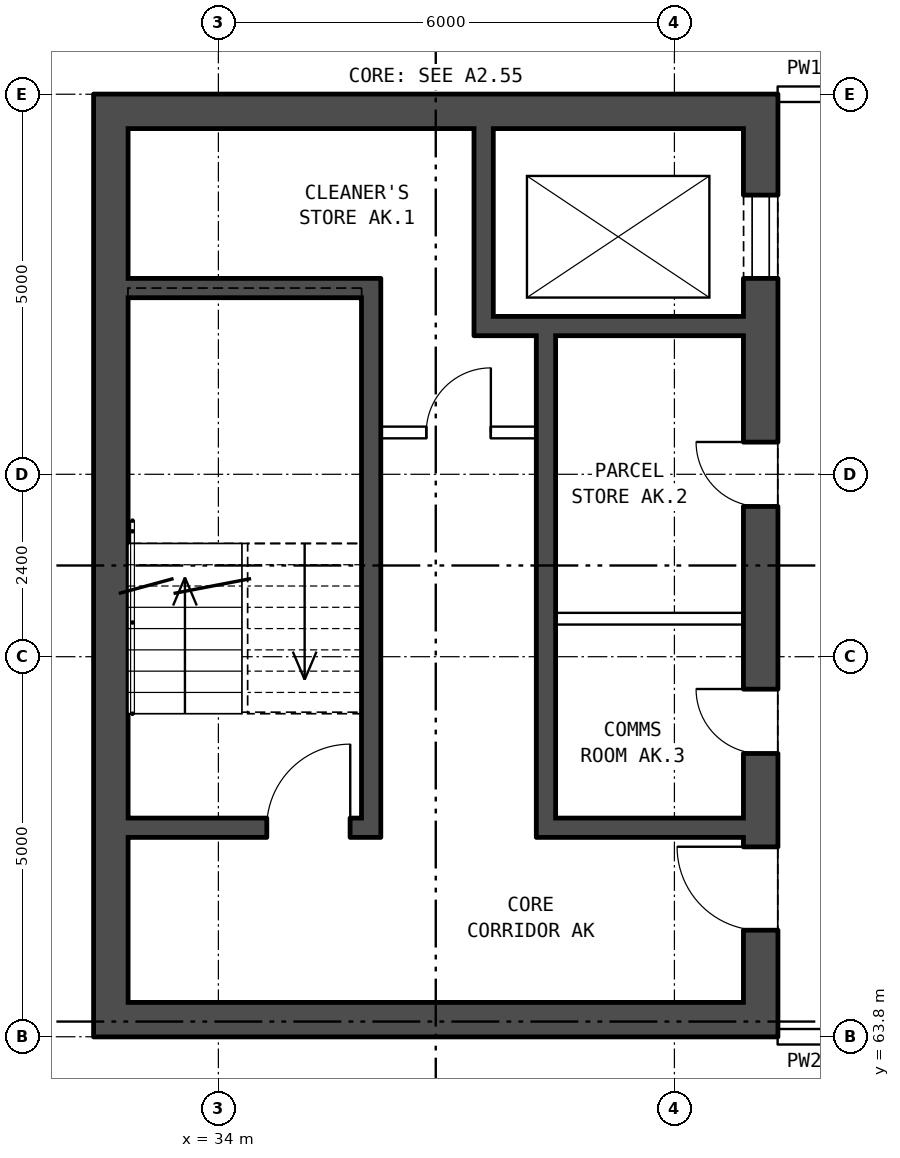
"""IFC4 building model, lengths in metres.
Left out: names, types, materials, properties, quantities, classifications, styles, units other than length and angle.
Written with IfcOpenShell. Run it as: python <this file> out.ifc"""

import sys

from ifc_helpers import new_model, si_unit, direction, frame, frame_2d, origin, place, context, subcontext, project, spatial, rectangle, extrude, element, fill, save


model = new_model("IFC4")
c1 = context("Model", 3, precision=1e-05, world=origin(), true_north=direction((0.0, 1.0)))
c2 = subcontext(c1, "Body", "Model", "MODEL_VIEW")
j1 = project(units=[si_unit("LENGTHUNIT", "METRE"), si_unit("PLANEANGLEUNIT", "RADIAN")], contexts=[c1])
p1 = place(None, origin())
s1 = spatial("IfcSite", under=j1, at=p1, CompositionType="ELEMENT")
p2 = place(p1, origin())
s2 = spatial("IfcBuilding", under=s1, at=p2, CompositionType="ELEMENT")
p3 = place(p2, frame((0.0, 0.0, 191.3)))
s3 = spatial("IfcBuildingStorey", under=s2, at=p3, CompositionType="ELEMENT", Elevation=191.3)
p4 = place(p3, frame((41.135, 76.2, 0.0), z_axis=(0.0, 0.0, 1.0), x_axis=(0.0, -1.0, 0.0)))
e1 = element("IfcWall", 1, at=p4, inside=s3, PredefinedType="SHEAR", context=c2, shape_type="SweptSolid", body=[
    extrude(rectangle(XDim=12.4, YDim=0.45, at=frame_2d((6.2, 0.0))), origin(), (0.0, 0.0, 1.0), 2.85),
])
p5 = place(p4, frame((1.325, 0.0, 0.0)))
e2 = element("IfcOpeningElement", 2, at=p5, cuts=e1, PredefinedType="OPENING", context=c2, shape_type="SweptSolid", body=[
    extrude(rectangle(XDim=1.1, YDim=2.1, at=frame_2d((0.55, 1.05))), frame((0.0, 0.235, 0.0), z_axis=(0.0, -1.0, 0.0), x_axis=(1.0, 0.0, 0.0)), (0.0, 0.0, 1.0), 0.47),
])
p6 = place(p4, frame((4.575, 0.0, 0.0)))
e3 = element("IfcOpeningElement", 3, at=p6, cuts=e1, PredefinedType="OPENING", context=c2, shape_type="SweptSolid", body=[
    extrude(rectangle(XDim=0.85, YDim=2.1, at=frame_2d((0.425, 1.05))), frame((0.0, 0.235, 0.0), z_axis=(0.0, -1.0, 0.0), x_axis=(1.0, 0.0, 0.0)), (0.0, 0.0, 1.0), 0.47),
])
p7 = place(p4, frame((7.825, 0.0, 0.0)))
e4 = element("IfcOpeningElement", 4, at=p7, cuts=e1, PredefinedType="OPENING", context=c2, shape_type="SweptSolid", body=[
    extrude(rectangle(XDim=0.85, YDim=2.1, at=frame_2d((0.425, 1.05))), frame((0.0, 0.235, 0.0), z_axis=(0.0, -1.0, 0.0), x_axis=(1.0, 0.0, 0.0)), (0.0, 0.0, 1.0), 0.47),
])
p8 = place(p4, frame((9.9, 0.0, 0.0)))
e5 = element("IfcOpeningElement", 5, at=p8, cuts=e1, PredefinedType="OPENING", context=c2, shape_type="SweptSolid", body=[
    extrude(rectangle(XDim=1.1, YDim=2.1, at=frame_2d((0.55, 1.05))), frame((0.0, 0.235, 0.0), z_axis=(0.0, -1.0, 0.0), x_axis=(1.0, 0.0, 0.0)), (0.0, 0.0, 1.0), 0.47),
])
p9 = place(p3, frame((32.585, 76.2, 0.0), z_axis=(0.0, 0.0, 1.0), x_axis=(0.0, -1.0, 0.0)))
e6 = element("IfcWall", 6, at=p9, inside=s3, PredefinedType="SHEAR", context=c2, shape_type="SweptSolid", body=[
    extrude(rectangle(XDim=12.4, YDim=0.45, at=frame_2d((6.2, 0.0))), origin(), (0.0, 0.0, 1.0), 2.85),
])
for number, where, z_axis, x_axis in (
    (7, (40.91, 75.975, 0.0), (0.0, 0.0, 1.0), (-1.0, 0.0, 0.0)),
    (8, (40.91, 64.025, 0.0), (0.0, 0.0, 1.0), (-1.0, 0.0, 0.0)),
):
    element("IfcWall", number, at=place(p3, frame(where, z_axis=z_axis, x_axis=x_axis)), inside=s3, PredefinedType="SHEAR", context=c2, shape_type="SweptSolid", body=[
        extrude(rectangle(XDim=8.1, YDim=0.45, at=frame_2d((4.05, 0.0))), origin(), (0.0, 0.0, 1.0), 2.85),
    ])
p10 = place(p3, frame((35.885, 73.65, 0.0), z_axis=(0.0, 0.0, 1.0), x_axis=(-1.0, 0.0, 0.0)))
e9 = element("IfcWall", 9, at=p10, inside=s3, PredefinedType="SHEAR", context=c2, shape_type="SweptSolid", body=[
    extrude(rectangle(XDim=3.075, YDim=0.25, at=frame_2d((1.538, 0.0))), origin(), (0.0, 0.0, 1.0), 2.85),
])
p11 = place(p3, frame((40.91, 73.15, 0.0), z_axis=(0.0, 0.0, 1.0), x_axis=(-1.0, 0.0, 0.0)))
e10 = element("IfcWall", 10, at=p11, inside=s3, PredefinedType="SHEAR", context=c2, shape_type="SweptSolid", body=[
    extrude(rectangle(XDim=3.545, YDim=0.25, at=frame_2d((1.772, 0.0))), origin(), (0.0, 0.0, 1.0), 2.85),
])
p12 = place(p3, frame((38.185, 71.75, 0.0), z_axis=(0.0, 0.0, 1.0), x_axis=(-1.0, 0.0, 0.0)))
e11 = element("IfcWall", 11, at=p12, inside=s3, PredefinedType="PARTITIONING", context=c2, shape_type="SweptSolid", body=[
    extrude(rectangle(XDim=2.05, YDim=0.15, at=frame_2d((1.025, 0.0))), origin(), (0.0, 0.0, 1.0), 2.85),
])
p13 = place(p12, frame((0.6, 0.0, 0.0)))
e12 = element("IfcOpeningElement", 12, at=p13, cuts=e11, PredefinedType="OPENING", context=c2, shape_type="SweptSolid", body=[
    extrude(rectangle(XDim=0.85, YDim=2.1, at=frame_2d((0.425, 1.05))), frame((0.0, 0.085, 0.0), z_axis=(0.0, -1.0, 0.0), x_axis=(1.0, 0.0, 0.0)), (0.0, 0.0, 1.0), 0.17),
])
p14 = place(p3, frame((40.91, 69.3, 0.0), z_axis=(0.0, 0.0, 1.0), x_axis=(-1.0, 0.0, 0.0)))
e13 = element("IfcWall", 13, at=p14, inside=s3, PredefinedType="PARTITIONING", context=c2, shape_type="SweptSolid", body=[
    extrude(rectangle(XDim=2.475, YDim=0.15, at=frame_2d((1.237, 0.0))), origin(), (0.0, 0.0, 1.0), 2.85),
])
p15 = place(p3, frame((40.91, 66.55, 0.0), z_axis=(0.0, 0.0, 1.0), x_axis=(-1.0, 0.0, 0.0)))
e14 = element("IfcWall", 14, at=p15, inside=s3, PredefinedType="SHEAR", context=c2, shape_type="SweptSolid", body=[
    extrude(rectangle(XDim=2.475, YDim=0.25, at=frame_2d((1.237, 0.0))), origin(), (0.0, 0.0, 1.0), 2.85),
])
p16 = place(p3, frame((35.885, 66.55, 0.0), z_axis=(0.0, 0.0, 1.0), x_axis=(-1.0, 0.0, 0.0)))
e15 = element("IfcWall", 15, at=p16, inside=s3, PredefinedType="SHEAR", context=c2, shape_type="SweptSolid", body=[
    extrude(rectangle(XDim=3.075, YDim=0.25, at=frame_2d((1.538, 0.0))), origin(), (0.0, 0.0, 1.0), 2.85),
])
p17 = place(p16, frame((0.15, 0.0, 0.0)))
e16 = element("IfcOpeningElement", 16, at=p17, cuts=e15, PredefinedType="OPENING", context=c2, shape_type="SweptSolid", body=[
    extrude(rectangle(XDim=1.1, YDim=2.1, at=frame_2d((0.55, 1.05))), frame((0.0, 0.135, 0.0), z_axis=(0.0, -1.0, 0.0), x_axis=(1.0, 0.0, 0.0)), (0.0, 0.0, 1.0), 0.27),
])
p18 = place(p3, frame((38.31, 73.025, 0.0), z_axis=(0.0, 0.0, 1.0), x_axis=(0.0, -1.0, 0.0)))
e17 = element("IfcWall", 17, at=p18, inside=s3, PredefinedType="SHEAR", context=c2, shape_type="SweptSolid", body=[
    extrude(rectangle(XDim=6.6, YDim=0.25, at=frame_2d((3.3, 0.0))), origin(), (0.0, 0.0, 1.0), 2.85),
])
p19 = place(p3, frame((37.49, 75.75, 0.0), z_axis=(0.0, 0.0, 1.0), x_axis=(0.0, -1.0, 0.0)))
e18 = element("IfcWall", 18, at=p19, inside=s3, PredefinedType="SHEAR", context=c2, shape_type="SweptSolid", body=[
    extrude(rectangle(XDim=2.475, YDim=0.25, at=frame_2d((1.238, 0.0))), origin(), (0.0, 0.0, 1.0), 2.85),
])
p20 = place(p3, frame((36.01, 73.775, 0.0), z_axis=(0.0, 0.0, 1.0), x_axis=(0.0, -1.0, 0.0)))
e19 = element("IfcWall", 19, at=p20, inside=s3, PredefinedType="SHEAR", context=c2, shape_type="SweptSolid", body=[
    extrude(rectangle(XDim=7.35, YDim=0.25, at=frame_2d((3.675, 0.0))), origin(), (0.0, 0.0, 1.0), 2.85),
])
p21 = place(p3, frame((41.36, 63.8, 0.0), z_axis=(0.0, 0.0, 1.0), x_axis=(1.0, 0.0, 0.0)))
e20 = element("IfcWall", 20, at=p21, inside=s3, PredefinedType="PARTITIONING", context=c2, shape_type="SweptSolid", body=[
    extrude(rectangle(XDim=3.0, YDim=0.2, at=frame_2d((1.5, 0.0))), origin(), (0.0, 0.0, 1.0), 2.85),
])
p22 = place(p21, frame((1.0, 0.0, 0.0)))
e21 = element("IfcOpeningElement", 21, at=p22, cuts=e20, PredefinedType="OPENING", context=c2, shape_type="SweptSolid", body=[
    extrude(rectangle(XDim=1.0, YDim=2.1, at=frame_2d((0.5, 1.05))), frame((0.0, 0.11, 0.0), z_axis=(0.0, -1.0, 0.0), x_axis=(1.0, 0.0, 0.0)), (0.0, 0.0, 1.0), 0.22),
])
p23 = place(p3, frame((41.36, 76.2, 0.0), z_axis=(0.0, 0.0, 1.0), x_axis=(1.0, 0.0, 0.0)))
e22 = element("IfcWall", 22, at=p23, inside=s3, PredefinedType="PARTITIONING", context=c2, shape_type="SweptSolid", body=[
    extrude(rectangle(XDim=3.0, YDim=0.2, at=frame_2d((1.5, 0.0))), origin(), (0.0, 0.0, 1.0), 2.85),
])
p24 = place(p23, frame((1.0, 0.0, 0.0)))
e23 = element("IfcOpeningElement", 23, at=p24, cuts=e22, PredefinedType="OPENING", context=c2, shape_type="SweptSolid", body=[
    extrude(rectangle(XDim=1.0, YDim=2.1, at=frame_2d((0.5, 1.05))), frame((0.0, 0.11, 0.0), z_axis=(0.0, -1.0, 0.0), x_axis=(1.0, 0.0, 0.0)), (0.0, 0.0, 1.0), 0.22),
])
p25 = place(p5, origin())
e24 = element("IfcDoor", 24, at=p25, inside=s3, OperationType="DOUBLE_DOOR_SLIDING", PredefinedType="DOOR", context=c2, shape_type="SweptSolid", body=[
    extrude(rectangle(XDim=1.1, YDim=2.1, at=frame_2d((0.55, 1.05))), frame((0.0, -0.16, 0.0), z_axis=(0.0, -1.0, 0.0), x_axis=(1.0, 0.0, 0.0)), (0.0, 0.0, 1.0), 0.05),
])
fill(e2, e24)
p26 = place(p6, frame((0.85, 0.0, 0.0), z_axis=(0.0, 0.0, 1.0), x_axis=(-1.0, 0.0, 0.0)))
e25 = element("IfcDoor", 25, at=p26, inside=s3, OperationType="SINGLE_SWING_RIGHT", PredefinedType="DOOR", context=c2, shape_type="SweptSolid", body=[
    extrude(rectangle(XDim=0.85, YDim=2.1, at=frame_2d((0.425, 1.05))), frame((0.0, 0.21, 0.0), z_axis=(0.0, -1.0, 0.0), x_axis=(1.0, 0.0, 0.0)), (0.0, 0.0, 1.0), 0.05),
])
fill(e3, e25)
p27 = place(p7, frame((0.85, 0.0, 0.0), z_axis=(0.0, 0.0, 1.0), x_axis=(-1.0, 0.0, 0.0)))
e26 = element("IfcDoor", 26, at=p27, inside=s3, OperationType="SINGLE_SWING_RIGHT", PredefinedType="DOOR", context=c2, shape_type="SweptSolid", body=[
    extrude(rectangle(XDim=0.85, YDim=2.1, at=frame_2d((0.425, 1.05))), frame((0.0, 0.21, 0.0), z_axis=(0.0, -1.0, 0.0), x_axis=(1.0, 0.0, 0.0)), (0.0, 0.0, 1.0), 0.05),
])
fill(e4, e26)
p28 = place(p8, frame((1.1, 0.0, 0.0), z_axis=(0.0, 0.0, 1.0), x_axis=(-1.0, 0.0, 0.0)))
e27 = element("IfcDoor", 27, at=p28, inside=s3, OperationType="SINGLE_SWING_RIGHT", PredefinedType="DOOR", context=c2, shape_type="SweptSolid", body=[
    extrude(rectangle(XDim=1.1, YDim=2.1, at=frame_2d((0.55, 1.05))), frame((0.0, 0.21, 0.0), z_axis=(0.0, -1.0, 0.0), x_axis=(1.0, 0.0, 0.0)), (0.0, 0.0, 1.0), 0.05),
])
fill(e5, e27)
p29 = place(p17, frame((1.1, 0.0, 0.0), z_axis=(0.0, 0.0, 1.0), x_axis=(-1.0, 0.0, 0.0)))
e28 = element("IfcDoor", 28, at=p29, inside=s3, OperationType="SINGLE_SWING_RIGHT", PredefinedType="DOOR", context=c2, shape_type="SweptSolid", body=[
    extrude(rectangle(XDim=1.1, YDim=2.1, at=frame_2d((0.55, 1.05))), frame((0.0, 0.025, 0.0), z_axis=(0.0, -1.0, 0.0), x_axis=(1.0, 0.0, 0.0)), (0.0, 0.0, 1.0), 0.05),
])
fill(e16, e28)
p30 = place(p13, frame((0.85, 0.0, 0.0), z_axis=(0.0, 0.0, 1.0), x_axis=(-1.0, 0.0, 0.0)))
e29 = element("IfcDoor", 29, at=p30, inside=s3, OperationType="SINGLE_SWING_RIGHT", PredefinedType="DOOR", context=c2, shape_type="SweptSolid", body=[
    extrude(rectangle(XDim=0.85, YDim=2.1, at=frame_2d((0.425, 1.05))), frame((0.0, 0.025, 0.0), z_axis=(0.0, -1.0, 0.0), x_axis=(1.0, 0.0, 0.0)), (0.0, 0.0, 1.0), 0.05),
])
fill(e12, e29)
save(model, sys.argv[1])
